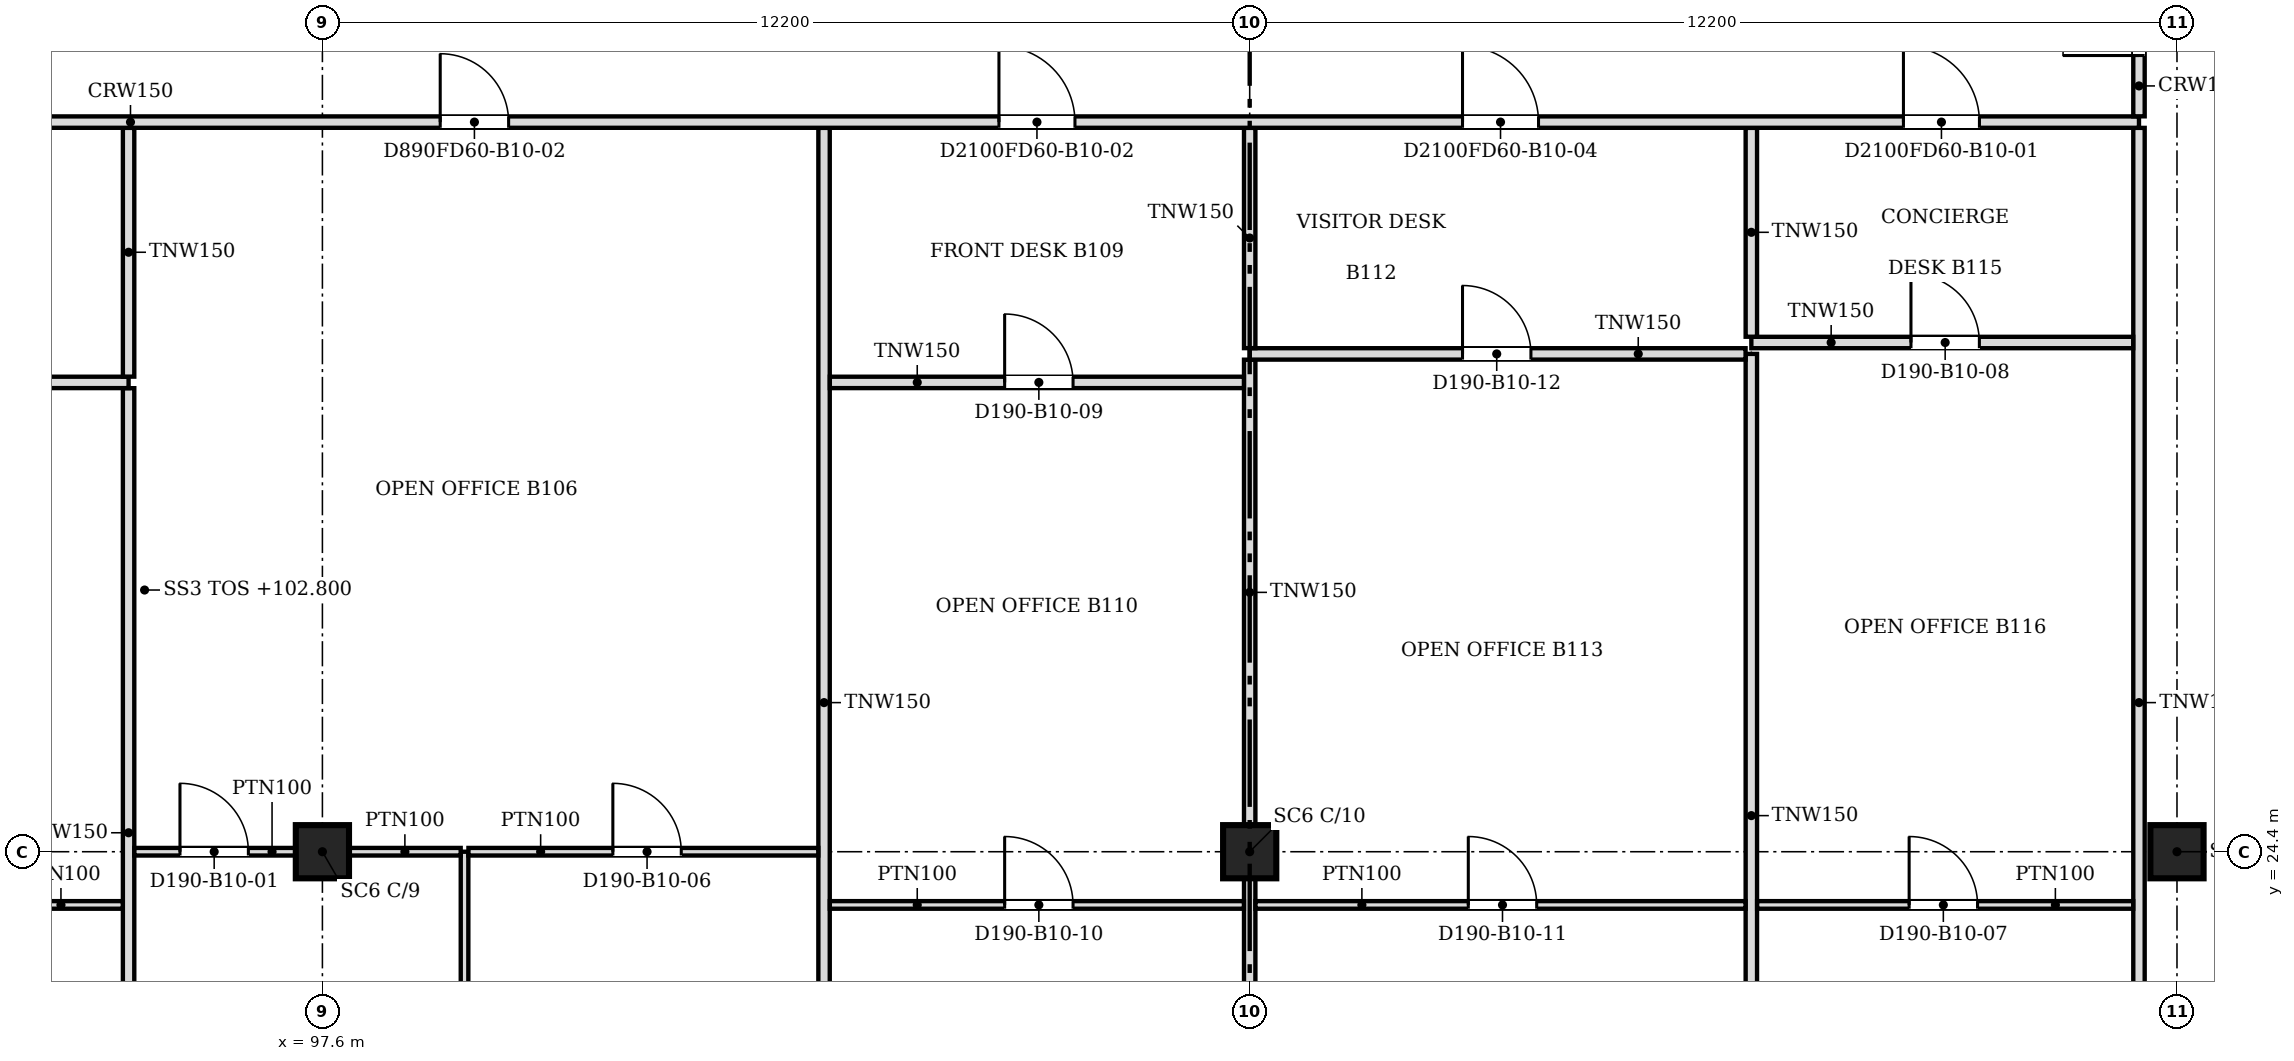
"""IFC4 building model, lengths in metres.
Left out: names, types, materials, properties, quantities, classifications, styles, units other than length and angle.
Written with IfcOpenShell. Run it as: python <this file> out.ifc"""

import sys

from ifc_helpers import new_model, si_unit, direction, frame, frame_2d, origin, origin_2d, place, context, subcontext, project, spatial, rectangle, extrude, source, transform, mapped, element, fill, save


model = new_model("IFC4")
c1 = context("Model", 3, precision=1e-05, world=origin(), true_north=direction((0.0, 1.0)))
c2 = subcontext(c1, "Body", "Model", "MODEL_VIEW")
j1 = project(units=[si_unit("LENGTHUNIT", "METRE"), si_unit("PLANEANGLEUNIT", "RADIAN")], contexts=[c1])
p1 = place(None, origin())
s1 = spatial("IfcSite", under=j1, at=p1, CompositionType="ELEMENT")
p2 = place(p1, origin())
s2 = spatial("IfcBuilding", under=s1, at=p2, CompositionType="ELEMENT")
p3 = place(p2, frame((0.0, 0.0, 102.8)))
s3 = spatial("IfcBuildingStorey", under=s2, at=p3, CompositionType="ELEMENT", Elevation=102.8)
for number, where, z_axis, x_axis in (
    (1, (97.6, 24.4, 0.0), (0.0, 0.0, 1.0), (1.0, 0.0, 0.0)),
    (2, (109.8, 24.4, 0.0), (0.0, 0.0, 1.0), (1.0, 0.0, 0.0)),
    (3, (122.0, 24.4, 0.0), (0.0, 0.0, 1.0), (1.0, 0.0, 0.0)),
):
    element("IfcColumn", number, at=place(p3, frame(where, z_axis=z_axis, x_axis=x_axis)), inside=s3, PredefinedType="COLUMN", context=c2, shape_type="SweptSolid", body=[
        extrude(rectangle(XDim=0.7, YDim=0.7, at=origin_2d()), origin(), (0.0, 0.0, 1.0), 3.55),
    ])
p4 = place(p3, frame((95.05, 18.8, 0.0), z_axis=(0.0, 0.0, 1.0), x_axis=(0.0, 1.0, 0.0)))
e4 = element("IfcWall", 4, at=p4, inside=s3, PredefinedType="PARTITIONING", context=c2, shape_type="SweptSolid", body=[
    extrude(rectangle(XDim=11.699, YDim=0.15, at=frame_2d((5.85, 0.0))), origin(), (0.0, 0.0, 1.0), 2.715),
])
p5 = place(p3, frame((99.47, 18.8, 0.0), z_axis=(0.0, 0.0, 1.0), x_axis=(0.0, 1.0, 0.0)))
e5 = element("IfcWall", 5, at=p5, inside=s3, PredefinedType="PARTITIONING", context=c2, shape_type="SweptSolid", body=[
    extrude(rectangle(XDim=5.6, YDim=0.1, at=frame_2d((2.8, 0.0))), origin(), (0.0, 0.0, 1.0), 2.715),
])
p6 = place(p3, frame((104.2, 18.8, 0.0), z_axis=(0.0, 0.0, 1.0), x_axis=(0.0, 1.0, 0.0)))
e6 = element("IfcWall", 6, at=p6, inside=s3, PredefinedType="PARTITIONING", context=c2, shape_type="SweptSolid", body=[
    extrude(rectangle(XDim=15.124, YDim=0.15, at=frame_2d((7.562, 0.0))), origin(), (0.0, 0.0, 1.0), 2.715),
])
p7 = place(p3, frame((109.8, 18.8, 0.0), z_axis=(0.0, 0.0, 1.0), x_axis=(0.0, 1.0, 0.0)))
e7 = element("IfcWall", 7, at=p7, inside=s3, PredefinedType="PARTITIONING", context=c2, shape_type="SweptSolid", body=[
    extrude(rectangle(XDim=5.249, YDim=0.15, at=frame_2d((2.625, 0.0))), origin(), (0.0, 0.0, 1.0), 2.715),
])
p8 = place(p3, frame((116.4, 18.8, 0.0), z_axis=(0.0, 0.0, 1.0), x_axis=(0.0, 1.0, 0.0)))
e8 = element("IfcWall", 8, at=p8, inside=s3, PredefinedType="PARTITIONING", context=c2, shape_type="SweptSolid", body=[
    extrude(rectangle(XDim=12.15, YDim=0.15, at=frame_2d((6.075, 0.0))), origin(), (0.0, 0.0, 1.0), 2.715),
])
p9 = place(p3, frame((121.5, 18.8, 0.0), z_axis=(0.0, 0.0, 1.0), x_axis=(0.0, 1.0, 0.0)))
e9 = element("IfcWall", 9, at=p9, inside=s3, PredefinedType="PARTITIONING", context=c2, shape_type="SweptSolid", body=[
    extrude(rectangle(XDim=15.124, YDim=0.15, at=frame_2d((7.562, 0.0))), origin(), (0.0, 0.0, 1.0), 2.715),
])
p10 = place(p3, frame((94.974, 23.7, 0.0), z_axis=(0.0, 0.0, 1.0), x_axis=(-1.0, 0.0, 0.0)))
e10 = element("IfcWall", 10, at=p10, inside=s3, PredefinedType="PARTITIONING", context=c2, shape_type="SweptSolid", body=[
    extrude(rectangle(XDim=4.128, YDim=0.1, at=frame_2d((2.064, 0.0))), origin(), (0.0, 0.0, 1.0), 2.715),
])
m1 = source(origin(), c2, "Body", "SweptSolid", [
    extrude(rectangle(XDim=0.9, YDim=2.1, at=frame_2d((0.45, 1.05))), frame((0.0, 0.06, 0.0), z_axis=(0.0, -1.0, 0.0), x_axis=(1.0, 0.0, 0.0)), (0.0, 0.0, 1.0), 0.12),
])
p11 = place(p10, frame((1.628, 0.0, 0.0)))
e11 = element("IfcOpeningElement", 11, at=p11, cuts=e10, PredefinedType="OPENING", context=c2, shape_type="MappedRepresentation", body=[
    mapped(m1, transform((0.0, 0.0, 0.0), scale=1.0)),
])
p12 = place(p3, frame((109.724, 23.7, 0.0), z_axis=(0.0, 0.0, 1.0), x_axis=(-1.0, 0.0, 0.0)))
e12 = element("IfcWall", 12, at=p12, inside=s3, PredefinedType="PARTITIONING", context=c2, shape_type="SweptSolid", body=[
    extrude(rectangle(XDim=5.448, YDim=0.1, at=frame_2d((2.724, 0.0))), origin(), (0.0, 0.0, 1.0), 2.715),
])
p13 = place(p12, frame((2.248, 0.0, 0.0)))
e13 = element("IfcOpeningElement", 13, at=p13, cuts=e12, PredefinedType="OPENING", context=c2, shape_type="MappedRepresentation", body=[
    mapped(m1, transform((0.0, 0.0, 0.0), scale=1.0)),
])
p14 = place(p3, frame((116.324, 23.7, 0.0), z_axis=(0.0, 0.0, 1.0), x_axis=(-1.0, 0.0, 0.0)))
e14 = element("IfcWall", 14, at=p14, inside=s3, PredefinedType="PARTITIONING", context=c2, shape_type="SweptSolid", body=[
    extrude(rectangle(XDim=6.448, YDim=0.1, at=frame_2d((3.224, 0.0))), origin(), (0.0, 0.0, 1.0), 2.715),
])
p15 = place(p14, frame((2.748, 0.0, 0.0)))
e15 = element("IfcOpeningElement", 15, at=p15, cuts=e14, PredefinedType="OPENING", context=c2, shape_type="MappedRepresentation", body=[
    mapped(m1, transform((0.0, 0.0, 0.0), scale=1.0)),
])
p16 = place(p3, frame((121.424, 23.7, 0.0), z_axis=(0.0, 0.0, 1.0), x_axis=(-1.0, 0.0, 0.0)))
e16 = element("IfcWall", 16, at=p16, inside=s3, PredefinedType="PARTITIONING", context=c2, shape_type="SweptSolid", body=[
    extrude(rectangle(XDim=4.948, YDim=0.1, at=frame_2d((2.474, 0.0))), origin(), (0.0, 0.0, 1.0), 2.715),
])
p17 = place(p16, frame((2.048, 0.0, 0.0)))
e17 = element("IfcOpeningElement", 17, at=p17, cuts=e16, PredefinedType="OPENING", context=c2, shape_type="MappedRepresentation", body=[
    mapped(m1, transform((0.0, 0.0, 0.0), scale=1.0)),
])
p18 = place(p3, frame((97.249, 24.4, 0.0), z_axis=(0.0, 0.0, 1.0), x_axis=(-1.0, 0.0, 0.0)))
e18 = element("IfcWall", 18, at=p18, inside=s3, PredefinedType="PARTITIONING", context=c2, shape_type="SweptSolid", body=[
    extrude(rectangle(XDim=2.123, YDim=0.1, at=frame_2d((1.062, 0.0))), origin(), (0.0, 0.0, 1.0), 2.715),
])
p19 = place(p18, frame((0.623, 0.0, 0.0)))
e19 = element("IfcOpeningElement", 19, at=p19, cuts=e18, PredefinedType="OPENING", context=c2, shape_type="MappedRepresentation", body=[
    mapped(m1, transform((0.0, 0.0, 0.0), scale=1.0)),
])
p20 = place(p3, frame((97.951, 24.4, 0.0), z_axis=(0.0, 0.0, 1.0), x_axis=(1.0, 0.0, 0.0)))
e20 = element("IfcWall", 20, at=p20, inside=s3, PredefinedType="PARTITIONING", context=c2, shape_type="SweptSolid", body=[
    extrude(rectangle(XDim=1.468, YDim=0.1, at=frame_2d((0.734, 0.0))), origin(), (0.0, 0.0, 1.0), 2.715),
])
p21 = place(p3, frame((104.124, 24.4, 0.0), z_axis=(0.0, 0.0, 1.0), x_axis=(-1.0, 0.0, 0.0)))
e21 = element("IfcWall", 21, at=p21, inside=s3, PredefinedType="PARTITIONING", context=c2, shape_type="SweptSolid", body=[
    extrude(rectangle(XDim=4.603, YDim=0.1, at=frame_2d((2.301, 0.0))), origin(), (0.0, 0.0, 1.0), 2.715),
])
p22 = place(p21, frame((1.803, 0.0, 0.0)))
e22 = element("IfcOpeningElement", 22, at=p22, cuts=e21, PredefinedType="OPENING", context=c2, shape_type="MappedRepresentation", body=[
    mapped(m1, transform((0.0, 0.0, 0.0), scale=1.0)),
])
p23 = place(p3, frame((109.8, 24.751, 0.0), z_axis=(0.0, 0.0, 1.0), x_axis=(0.0, 1.0, 0.0)))
e23 = element("IfcWall", 23, at=p23, inside=s3, PredefinedType="PARTITIONING", context=c2, shape_type="SweptSolid", body=[
    extrude(rectangle(XDim=6.123, YDim=0.15, at=frame_2d((3.062, 0.0))), origin(), (0.0, 0.0, 1.0), 2.715),
])
p24 = place(p3, frame((95.05, 30.575, 0.0), z_axis=(0.0, 0.0, 1.0), x_axis=(-1.0, 0.0, 0.0)))
e24 = element("IfcWall", 24, at=p24, inside=s3, PredefinedType="PARTITIONING", context=c2, shape_type="SweptSolid", body=[
    extrude(rectangle(XDim=9.15, YDim=0.15, at=frame_2d((4.575, 0.0))), origin(), (0.0, 0.0, 1.0), 2.715),
])
m2 = source(origin(), c2, "Body", "SweptSolid", [
    extrude(rectangle(XDim=0.9, YDim=2.1, at=frame_2d((0.45, 1.05))), frame((0.0, 0.085, 0.0), z_axis=(0.0, -1.0, 0.0), x_axis=(1.0, 0.0, 0.0)), (0.0, 0.0, 1.0), 0.17),
])
p25 = place(p24, frame((4.15, 0.0, 0.0)))
e25 = element("IfcOpeningElement", 25, at=p25, cuts=e24, PredefinedType="OPENING", context=c2, shape_type="MappedRepresentation", body=[
    mapped(m2, transform((0.0, 0.0, 0.0), scale=1.0)),
])
p26 = place(p3, frame((109.724, 30.575, 0.0), z_axis=(0.0, 0.0, 1.0), x_axis=(-1.0, 0.0, 0.0)))
e26 = element("IfcWall", 26, at=p26, inside=s3, PredefinedType="PARTITIONING", context=c2, shape_type="SweptSolid", body=[
    extrude(rectangle(XDim=5.448, YDim=0.15, at=frame_2d((2.724, 0.0))), origin(), (0.0, 0.0, 1.0), 2.715),
])
p27 = place(p26, frame((2.248, 0.0, 0.0)))
e27 = element("IfcOpeningElement", 27, at=p27, cuts=e26, PredefinedType="OPENING", context=c2, shape_type="MappedRepresentation", body=[
    mapped(m2, transform((0.0, 0.0, 0.0), scale=1.0)),
])
p28 = place(p3, frame((95.05, 30.651, 0.0), z_axis=(0.0, 0.0, 1.0), x_axis=(0.0, 1.0, 0.0)))
e28 = element("IfcWall", 28, at=p28, inside=s3, PredefinedType="PARTITIONING", context=c2, shape_type="SweptSolid", body=[
    extrude(rectangle(XDim=3.273, YDim=0.15, at=frame_2d((1.637, 0.0))), origin(), (0.0, 0.0, 1.0), 2.715),
])
p29 = place(p3, frame((116.324, 30.95, 0.0), z_axis=(0.0, 0.0, 1.0), x_axis=(-1.0, 0.0, 0.0)))
e29 = element("IfcWall", 29, at=p29, inside=s3, PredefinedType="PARTITIONING", context=c2, shape_type="SweptSolid", body=[
    extrude(rectangle(XDim=6.524, YDim=0.15, at=frame_2d((3.262, 0.0))), origin(), (0.0, 0.0, 1.0), 2.715),
])
p30 = place(p29, frame((2.824, 0.0, 0.0)))
e30 = element("IfcOpeningElement", 30, at=p30, cuts=e29, PredefinedType="OPENING", context=c2, shape_type="MappedRepresentation", body=[
    mapped(m2, transform((0.0, 0.0, 0.0), scale=1.0)),
])
p31 = place(p3, frame((109.8, 31.026, 0.0), z_axis=(0.0, 0.0, 1.0), x_axis=(0.0, 1.0, 0.0)))
e31 = element("IfcWall", 31, at=p31, inside=s3, PredefinedType="PARTITIONING", context=c2, shape_type="SweptSolid", body=[
    extrude(rectangle(XDim=2.898, YDim=0.15, at=frame_2d((1.449, 0.0))), origin(), (0.0, 0.0, 1.0), 2.715),
])
p32 = place(p3, frame((121.424, 31.1, 0.0), z_axis=(0.0, 0.0, 1.0), x_axis=(-1.0, 0.0, 0.0)))
e32 = element("IfcWall", 32, at=p32, inside=s3, PredefinedType="PARTITIONING", context=c2, shape_type="SweptSolid", body=[
    extrude(rectangle(XDim=5.024, YDim=0.15, at=frame_2d((2.512, 0.0))), origin(), (0.0, 0.0, 1.0), 2.715),
])
p33 = place(p32, frame((2.024, 0.0, 0.0)))
e33 = element("IfcOpeningElement", 33, at=p33, cuts=e32, PredefinedType="OPENING", context=c2, shape_type="MappedRepresentation", body=[
    mapped(m2, transform((0.0, 0.0, 0.0), scale=1.0)),
])
p34 = place(p3, frame((116.4, 31.176, 0.0), z_axis=(0.0, 0.0, 1.0), x_axis=(0.0, 1.0, 0.0)))
e34 = element("IfcWall", 34, at=p34, inside=s3, PredefinedType="PARTITIONING", context=c2, shape_type="SweptSolid", body=[
    extrude(rectangle(XDim=2.748, YDim=0.15, at=frame_2d((1.374, 0.0))), origin(), (0.0, 0.0, 1.0), 2.715),
])
p35 = place(p3, frame((121.5, 34.0, 0.0), z_axis=(0.0, 0.0, 1.0), x_axis=(-1.0, 0.0, 0.0)))
e35 = element("IfcWall", 35, at=p35, inside=s3, PredefinedType="PARTITIONING", context=c2, shape_type="SweptSolid", body=[
    extrude(rectangle(XDim=35.6, YDim=0.15, at=frame_2d((17.8, 0.0))), origin(), (0.0, 0.0, 1.0), 2.715),
])
m3 = source(origin(), c2, "Body", "SweptSolid", [
    extrude(rectangle(XDim=1.0, YDim=2.1, at=frame_2d((0.5, 1.05))), frame((0.0, 0.085, 0.0), z_axis=(0.0, -1.0, 0.0), x_axis=(1.0, 0.0, 0.0)), (0.0, 0.0, 1.0), 0.17),
])
p36 = place(p35, frame((2.099, 0.0, 0.0)))
e36 = element("IfcOpeningElement", 36, at=p36, cuts=e35, PredefinedType="OPENING", context=c2, shape_type="MappedRepresentation", body=[
    mapped(m3, transform((0.0, 0.0, 0.0), scale=1.0)),
])
p37 = place(p35, frame((13.999, 0.0, 0.0)))
e37 = element("IfcOpeningElement", 37, at=p37, cuts=e35, PredefinedType="OPENING", context=c2, shape_type="MappedRepresentation", body=[
    mapped(m3, transform((0.0, 0.0, 0.0), scale=1.0)),
])
p38 = place(p35, frame((7.9, 0.0, 0.0)))
e38 = element("IfcOpeningElement", 38, at=p38, cuts=e35, PredefinedType="OPENING", context=c2, shape_type="MappedRepresentation", body=[
    mapped(m3, transform((0.0, 0.0, 0.0), scale=1.0)),
])
p39 = place(p35, frame((30.5, 0.0, 0.0)))
e39 = element("IfcOpeningElement", 39, at=p39, cuts=e35, PredefinedType="OPENING", context=c2, shape_type="MappedRepresentation", body=[
    mapped(m3, transform((0.0, 0.0, 0.0), scale=1.0)),
])
p40 = place(p35, frame((21.45, 0.0, 0.0)))
e40 = element("IfcOpeningElement", 40, at=p40, cuts=e35, PredefinedType="OPENING", context=c2, shape_type="MappedRepresentation", body=[
    mapped(m2, transform((0.0, 0.0, 0.0), scale=1.0)),
])
p41 = place(p3, frame((121.5, 36.6, 0.0), z_axis=(0.0, 0.0, 1.0), x_axis=(0.0, -1.0, 0.0)))
e41 = element("IfcWall", 41, at=p41, inside=s3, PredefinedType="PARTITIONING", context=c2, shape_type="SweptSolid", body=[
    extrude(rectangle(XDim=2.524, YDim=0.15, at=frame_2d((1.262, 0.0))), origin(), (0.0, 0.0, 1.0), 2.715),
])
p42 = place(p41, frame((0.724, 0.0, 0.0)))
e42 = element("IfcOpeningElement", 42, at=p42, cuts=e41, PredefinedType="OPENING", context=c2, shape_type="MappedRepresentation", body=[
    mapped(m3, transform((0.0, 0.0, 0.0), scale=1.0)),
])
m4 = source(origin(), c2, "Body", "SweptSolid", [
    extrude(rectangle(XDim=0.9, YDim=2.1, at=frame_2d((0.45, 1.05))), frame((0.0, 0.025, 0.0), z_axis=(0.0, -1.0, 0.0), x_axis=(1.0, 0.0, 0.0)), (0.0, 0.0, 1.0), 0.05),
])
p43 = place(p19, origin())
e43 = element("IfcDoor", 43, at=p43, inside=s3, OperationType="SINGLE_SWING_RIGHT", PredefinedType="DOOR", context=c2, shape_type="MappedRepresentation", body=[
    mapped(m4, transform((0.0, 0.0, 0.0), scale=1.0)),
])
fill(e19, e43)
p44 = place(p22, origin())
e44 = element("IfcDoor", 44, at=p44, inside=s3, OperationType="SINGLE_SWING_RIGHT", PredefinedType="DOOR", context=c2, shape_type="MappedRepresentation", body=[
    mapped(m4, transform((0.0, 0.0, 0.0), scale=1.0)),
])
fill(e22, e44)
p45 = place(p17, origin())
e45 = element("IfcDoor", 45, at=p45, inside=s3, OperationType="SINGLE_SWING_RIGHT", PredefinedType="DOOR", context=c2, shape_type="MappedRepresentation", body=[
    mapped(m4, transform((0.0, 0.0, 0.0), scale=1.0)),
])
fill(e17, e45)
p46 = place(p33, origin())
e46 = element("IfcDoor", 46, at=p46, inside=s3, OperationType="SINGLE_SWING_RIGHT", PredefinedType="DOOR", context=c2, shape_type="MappedRepresentation", body=[
    mapped(m4, transform((0.0, 0.0, 0.0), scale=1.0)),
])
fill(e33, e46)
m5 = source(origin(), c2, "Body", "SweptSolid", [
    extrude(rectangle(XDim=1.0, YDim=2.1, at=frame_2d((0.5, 1.05))), frame((0.0, 0.025, 0.0), z_axis=(0.0, -1.0, 0.0), x_axis=(1.0, 0.0, 0.0)), (0.0, 0.0, 1.0), 0.05),
])
p47 = place(p36, origin())
e47 = element("IfcDoor", 47, at=p47, inside=s3, OperationType="SINGLE_SWING_RIGHT", PredefinedType="DOOR", context=c2, shape_type="MappedRepresentation", body=[
    mapped(m5, transform((0.0, 0.0, 0.0), scale=1.0)),
])
fill(e36, e47)
p48 = place(p27, origin())
e48 = element("IfcDoor", 48, at=p48, inside=s3, OperationType="SINGLE_SWING_RIGHT", PredefinedType="DOOR", context=c2, shape_type="MappedRepresentation", body=[
    mapped(m4, transform((0.0, 0.0, 0.0), scale=1.0)),
])
fill(e27, e48)
p49 = place(p13, origin())
e49 = element("IfcDoor", 49, at=p49, inside=s3, OperationType="SINGLE_SWING_RIGHT", PredefinedType="DOOR", context=c2, shape_type="MappedRepresentation", body=[
    mapped(m4, transform((0.0, 0.0, 0.0), scale=1.0)),
])
fill(e13, e49)
p50 = place(p37, origin())
e50 = element("IfcDoor", 50, at=p50, inside=s3, OperationType="SINGLE_SWING_RIGHT", PredefinedType="DOOR", context=c2, shape_type="MappedRepresentation", body=[
    mapped(m5, transform((0.0, 0.0, 0.0), scale=1.0)),
])
fill(e37, e50)
p51 = place(p15, origin())
e51 = element("IfcDoor", 51, at=p51, inside=s3, OperationType="SINGLE_SWING_RIGHT", PredefinedType="DOOR", context=c2, shape_type="MappedRepresentation", body=[
    mapped(m4, transform((0.0, 0.0, 0.0), scale=1.0)),
])
fill(e15, e51)
p52 = place(p30, origin())
e52 = element("IfcDoor", 52, at=p52, inside=s3, OperationType="SINGLE_SWING_RIGHT", PredefinedType="DOOR", context=c2, shape_type="MappedRepresentation", body=[
    mapped(m4, transform((0.0, 0.0, 0.0), scale=1.0)),
])
fill(e30, e52)
p53 = place(p38, origin())
e53 = element("IfcDoor", 53, at=p53, inside=s3, OperationType="SINGLE_SWING_RIGHT", PredefinedType="DOOR", context=c2, shape_type="MappedRepresentation", body=[
    mapped(m5, transform((0.0, 0.0, 0.0), scale=1.0)),
])
fill(e38, e53)
p54 = place(p40, origin())
e54 = element("IfcDoor", 54, at=p54, inside=s3, OperationType="SINGLE_SWING_RIGHT", PredefinedType="DOOR", context=c2, shape_type="MappedRepresentation", body=[
    mapped(m4, transform((0.0, 0.0, 0.0), scale=1.0)),
])
fill(e40, e54)
p55 = place(p42, origin())
e55 = element("IfcDoor", 55, at=p55, inside=s3, OperationType="SINGLE_SWING_RIGHT", PredefinedType="DOOR", context=c2, shape_type="MappedRepresentation", body=[
    mapped(m5, transform((0.0, 0.0, 0.0), scale=1.0)),
])
fill(e42, e55)
save(model, sys.argv[1])
